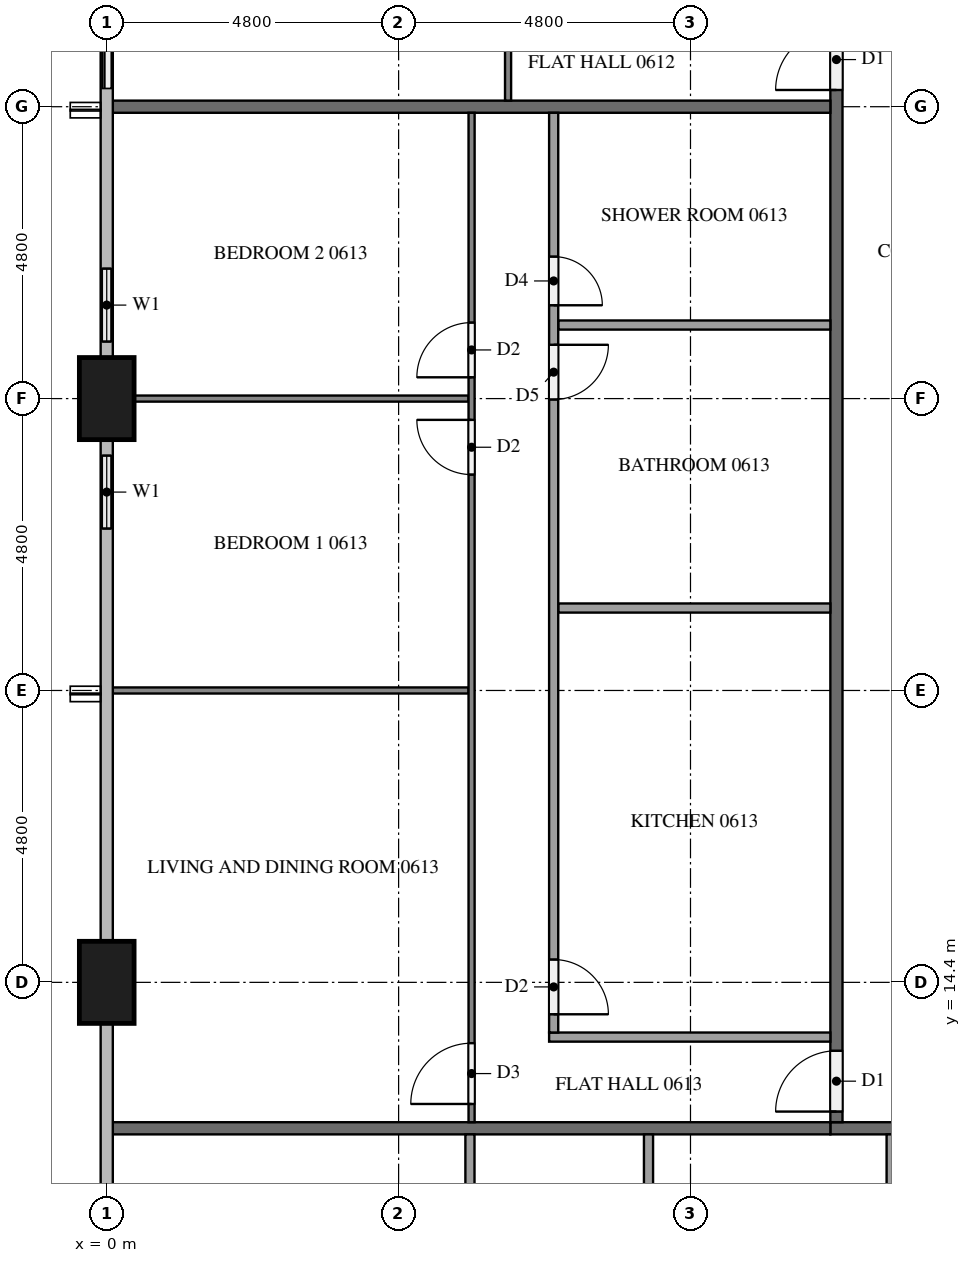
"""IFC4 building model, lengths in metres.
Left out: names, types, materials, properties, quantities, classifications, styles, units other than length and angle.
Written with IfcOpenShell. Run it as: python <this file> out.ifc"""

import sys

from ifc_helpers import new_model, si_unit, direction, frame, frame_2d, origin, origin_2d, place, context, subcontext, project, spatial, rectangle, extrude, element, fill, save


model = new_model("IFC4")
c1 = context("Model", 3, precision=1e-05, world=origin(), true_north=direction((0.0, 1.0)))
c2 = subcontext(c1, "Body", "Model", "MODEL_VIEW")
j1 = project(units=[si_unit("LENGTHUNIT", "METRE"), si_unit("PLANEANGLEUNIT", "RADIAN")], contexts=[c1])
p1 = place(None, origin())
s1 = spatial("IfcSite", under=j1, at=p1, CompositionType="ELEMENT")
p2 = place(p1, origin())
s2 = spatial("IfcBuilding", under=s1, at=p2, CompositionType="ELEMENT")
p3 = place(p2, frame((0.0, 0.0, 29.4)))
s3 = spatial("IfcBuildingStorey", under=s2, at=p3, CompositionType="ELEMENT", Elevation=29.4)
for number, where, z_axis, x_axis in (
    (1, (0.0, 24.0, 0.0), (0.0, 0.0, 1.0), (0.0, 1.0, 0.0)),
    (2, (0.0, 14.4, 0.0), (0.0, 0.0, 1.0), (0.0, 1.0, 0.0)),
):
    element("IfcColumn", number, at=place(p3, frame(where, z_axis=z_axis, x_axis=x_axis)), inside=s3, PredefinedType="COLUMN", context=c2, shape_type="SweptSolid", body=[
        extrude(rectangle(XDim=1.35, YDim=0.9, at=origin_2d()), origin(), (0.0, 0.0, 1.0), 3.2),
    ])
p4 = place(p3, frame((0.0, 31.2, 0.0), z_axis=(0.0, 0.0, 1.0), x_axis=(0.0, -1.0, 0.0)))
e3 = element("IfcWall", 3, at=p4, inside=s3, PredefinedType="SOLIDWALL", context=c2, shape_type="SweptSolid", body=[
    extrude(rectangle(XDim=2.4, YDim=0.15, at=frame_2d((1.2, 0.0))), origin(), (0.0, 0.0, 1.0), 3.2),
])
p5 = place(p4, frame((0.3, 0.0, 0.0)))
e4 = element("IfcOpeningElement", 4, at=p5, cuts=e3, PredefinedType="OPENING", context=c2, shape_type="SweptSolid", body=[
    extrude(rectangle(XDim=1.8, YDim=2.4, at=frame_2d((0.9, 1.2))), frame((0.0, 0.085, 0.0), z_axis=(0.0, -1.0, 0.0), x_axis=(1.0, 0.0, 0.0)), (0.0, 0.0, 1.0), 0.17),
])
p6 = place(p3, frame((0.0, 26.4, 0.0), z_axis=(0.0, 0.0, 1.0), x_axis=(0.0, -1.0, 0.0)))
e5 = element("IfcWall", 5, at=p6, inside=s3, PredefinedType="SOLIDWALL", context=c2, shape_type="SweptSolid", body=[
    extrude(rectangle(XDim=1.725, YDim=0.15, at=frame_2d((0.862, 0.0))), origin(), (0.0, 0.0, 1.0), 3.2),
])
p7 = place(p6, frame((0.262, 0.0, 0.9)))
e6 = element("IfcOpeningElement", 6, at=p7, cuts=e5, PredefinedType="OPENING", context=c2, shape_type="SweptSolid", body=[
    extrude(rectangle(XDim=1.2, YDim=1.4, at=frame_2d((0.6, 0.7))), frame((0.0, 0.085, 0.0), z_axis=(0.0, -1.0, 0.0), x_axis=(1.0, 0.0, 0.0)), (0.0, 0.0, 1.0), 0.17),
])
p8 = place(p3, frame((0.0, 23.325, 0.0), z_axis=(0.0, 0.0, 1.0), x_axis=(0.0, -1.0, 0.0)))
e7 = element("IfcWall", 7, at=p8, inside=s3, PredefinedType="SOLIDWALL", context=c2, shape_type="SweptSolid", body=[
    extrude(rectangle(XDim=1.725, YDim=0.15, at=frame_2d((0.862, 0.0))), origin(), (0.0, 0.0, 1.0), 3.2),
])
p9 = place(p8, frame((0.262, 0.0, 0.9)))
e8 = element("IfcOpeningElement", 8, at=p9, cuts=e7, PredefinedType="OPENING", context=c2, shape_type="SweptSolid", body=[
    extrude(rectangle(XDim=1.2, YDim=1.4, at=frame_2d((0.6, 0.7))), frame((0.0, 0.085, 0.0), z_axis=(0.0, -1.0, 0.0), x_axis=(1.0, 0.0, 0.0)), (0.0, 0.0, 1.0), 0.17),
])
p10 = place(p3, frame((50.5, 12.0, 0.0), z_axis=(0.0, 0.0, 1.0), x_axis=(-1.0, 0.0, 0.0)))
e9 = element("IfcWall", 9, at=p10, inside=s3, PredefinedType="PARTITIONING", context=c2, shape_type="SweptSolid", body=[
    extrude(rectangle(XDim=38.6, YDim=0.2, at=frame_2d((19.3, 0.0))), origin(), (0.0, 0.0, 1.0), 3.2),
])
p11 = place(p10, frame((36.375, 0.0, 0.0)))
e10 = element("IfcOpeningElement", 10, at=p11, cuts=e9, PredefinedType="OPENING", context=c2, shape_type="SweptSolid", body=[
    extrude(rectangle(XDim=1.0, YDim=2.1, at=frame_2d((0.5, 1.05))), frame((0.0, 0.11, 0.0), z_axis=(0.0, -1.0, 0.0), x_axis=(1.0, 0.0, 0.0)), (0.0, 0.0, 1.0), 0.22),
])
p12 = place(p10, frame((34.825, 0.0, 0.0)))
e11 = element("IfcOpeningElement", 11, at=p12, cuts=e9, PredefinedType="OPENING", context=c2, shape_type="SweptSolid", body=[
    extrude(rectangle(XDim=1.0, YDim=2.1, at=frame_2d((0.5, 1.05))), frame((0.0, 0.11, 0.0), z_axis=(0.0, -1.0, 0.0), x_axis=(1.0, 0.0, 0.0)), (0.0, 0.0, 1.0), 0.22),
])
p13 = place(p10, frame((22.825, 0.0, 0.0)))
e12 = element("IfcOpeningElement", 12, at=p13, cuts=e9, PredefinedType="OPENING", context=c2, shape_type="SweptSolid", body=[
    extrude(rectangle(XDim=1.0, YDim=2.1, at=frame_2d((0.5, 1.05))), frame((0.0, 0.11, 0.0), z_axis=(0.0, -1.0, 0.0), x_axis=(1.0, 0.0, 0.0)), (0.0, 0.0, 1.0), 0.22),
])
p14 = place(p10, frame((8.425, 0.0, 0.0)))
e13 = element("IfcOpeningElement", 13, at=p14, cuts=e9, PredefinedType="OPENING", context=c2, shape_type="SweptSolid", body=[
    extrude(rectangle(XDim=1.0, YDim=2.1, at=frame_2d((0.5, 1.05))), frame((0.0, 0.11, 0.0), z_axis=(0.0, -1.0, 0.0), x_axis=(1.0, 0.0, 0.0)), (0.0, 0.0, 1.0), 0.22),
])
p15 = place(p10, frame((1.225, 0.0, 0.0)))
e14 = element("IfcOpeningElement", 14, at=p15, cuts=e9, PredefinedType="OPENING", context=c2, shape_type="SweptSolid", body=[
    extrude(rectangle(XDim=1.0, YDim=2.1, at=frame_2d((0.5, 1.05))), frame((0.0, 0.11, 0.0), z_axis=(0.0, -1.0, 0.0), x_axis=(1.0, 0.0, 0.0)), (0.0, 0.0, 1.0), 0.22),
])
p16 = place(p3, frame((12.0, 12.1, 0.0), z_axis=(0.0, 0.0, 1.0), x_axis=(0.0, 1.0, 0.0)))
e15 = element("IfcWall", 15, at=p16, inside=s3, PredefinedType="PARTITIONING", context=c2, shape_type="SweptSolid", body=[
    extrude(rectangle(XDim=28.6, YDim=0.2, at=frame_2d((14.3, 0.0))), origin(), (0.0, 0.0, 1.0), 3.2),
])
p17 = place(p16, frame((16.975, 0.0, 0.0)))
e16 = element("IfcOpeningElement", 16, at=p17, cuts=e15, PredefinedType="OPENING", context=c2, shape_type="SweptSolid", body=[
    extrude(rectangle(XDim=1.0, YDim=2.1, at=frame_2d((0.5, 1.05))), frame((0.0, 0.11, 0.0), z_axis=(0.0, -1.0, 0.0), x_axis=(1.0, 0.0, 0.0)), (0.0, 0.0, 1.0), 0.22),
])
p18 = place(p16, frame((0.175, 0.0, 0.0)))
e17 = element("IfcOpeningElement", 17, at=p18, cuts=e15, PredefinedType="OPENING", context=c2, shape_type="SweptSolid", body=[
    extrude(rectangle(XDim=1.0, YDim=2.1, at=frame_2d((0.5, 1.05))), frame((0.0, 0.11, 0.0), z_axis=(0.0, -1.0, 0.0), x_axis=(1.0, 0.0, 0.0)), (0.0, 0.0, 1.0), 0.22),
])
for number, where, z_axis, x_axis in (
    (18, (0.1, 12.0, 0.0), (0.0, 0.0, 1.0), (1.0, 0.0, 0.0)),
    (19, (0.1, 28.8, 0.0), (0.0, 0.0, 1.0), (1.0, 0.0, 0.0)),
):
    element("IfcWall", number, at=place(p3, frame(where, z_axis=z_axis, x_axis=x_axis)), inside=s3, PredefinedType="PARTITIONING", context=c2, shape_type="SweptSolid", body=[
        extrude(rectangle(XDim=11.8, YDim=0.2, at=frame_2d((5.9, 0.0))), origin(), (0.0, 0.0, 1.0), 3.2),
    ])
for number, where, z_axis, x_axis in (
    (20, (8.91, 11.9, 0.0), (0.0, 0.0, 1.0), (0.0, -1.0, 0.0)),
    (21, (5.973, 11.9, 0.0), (0.0, 0.0, 1.0), (0.0, -1.0, 0.0)),
):
    element("IfcWall", number, at=place(p3, frame(where, z_axis=z_axis, x_axis=x_axis)), inside=s3, PredefinedType="PARTITIONING", context=c2, shape_type="SweptSolid", body=[
        extrude(rectangle(XDim=2.975, YDim=0.15, at=frame_2d((1.487, 0.0))), origin(), (0.0, 0.0, 1.0), 3.2),
    ])
p19 = place(p3, frame((12.9, 11.9, 0.0), z_axis=(0.0, 0.0, 1.0), x_axis=(0.0, -1.0, 0.0)))
e22 = element("IfcWall", 22, at=p19, inside=s3, PredefinedType="PARTITIONING", context=c2, shape_type="SweptSolid", body=[
    extrude(rectangle(XDim=3.125, YDim=0.15, at=frame_2d((1.562, 0.0))), origin(), (0.0, 0.0, 1.0), 3.2),
])
p20 = place(p3, frame((6.6, 28.9, 0.0), z_axis=(0.0, 0.0, 1.0), x_axis=(0.0, 1.0, 0.0)))
e23 = element("IfcWall", 23, at=p20, inside=s3, PredefinedType="PARTITIONING", context=c2, shape_type="SweptSolid", body=[
    extrude(rectangle(XDim=11.8, YDim=0.1, at=frame_2d((5.9, 0.0))), origin(), (0.0, 0.0, 1.0), 3.2),
])
p21 = place(p20, frame((5.75, 0.0, 0.0)))
e24 = element("IfcOpeningElement", 24, at=p21, cuts=e23, PredefinedType="OPENING", context=c2, shape_type="SweptSolid", body=[
    extrude(rectangle(XDim=1.0, YDim=2.1, at=frame_2d((0.5, 1.05))), frame((0.0, 0.06, 0.0), z_axis=(0.0, -1.0, 0.0), x_axis=(1.0, 0.0, 0.0)), (0.0, 0.0, 1.0), 0.12),
])
p22 = place(p20, frame((7.45, 0.0, 0.0)))
e25 = element("IfcOpeningElement", 25, at=p22, cuts=e23, PredefinedType="OPENING", context=c2, shape_type="SweptSolid", body=[
    extrude(rectangle(XDim=0.9, YDim=2.1, at=frame_2d((0.45, 1.05))), frame((0.0, 0.06, 0.0), z_axis=(0.0, -1.0, 0.0), x_axis=(1.0, 0.0, 0.0)), (0.0, 0.0, 1.0), 0.12),
])
p23 = place(p3, frame((5.95, 19.2, 0.0), z_axis=(0.0, 0.0, 1.0), x_axis=(-1.0, 0.0, 0.0)))
e26 = element("IfcWall", 26, at=p23, inside=s3, PredefinedType="PARTITIONING", context=c2, shape_type="SweptSolid", body=[
    extrude(rectangle(XDim=5.85, YDim=0.1, at=frame_2d((2.925, 0.0))), origin(), (0.0, 0.0, 1.0), 3.2),
])
p24 = place(p3, frame((5.95, 24.0, 0.0), z_axis=(0.0, 0.0, 1.0), x_axis=(-1.0, 0.0, 0.0)))
e27 = element("IfcWall", 27, at=p24, inside=s3, PredefinedType="PARTITIONING", context=c2, shape_type="SweptSolid", body=[
    extrude(rectangle(XDim=5.5, YDim=0.1, at=frame_2d((2.75, 0.0))), origin(), (0.0, 0.0, 1.0), 3.2),
])
p25 = place(p3, frame((6.0, 12.1, 0.0), z_axis=(0.0, 0.0, 1.0), x_axis=(0.0, 1.0, 0.0)))
e28 = element("IfcWall", 28, at=p25, inside=s3, PredefinedType="PARTITIONING", context=c2, shape_type="SweptSolid", body=[
    extrude(rectangle(XDim=16.6, YDim=0.1, at=frame_2d((8.3, 0.0))), origin(), (0.0, 0.0, 1.0), 3.2),
])
p26 = place(p25, frame((0.3, 0.0, 0.0)))
e29 = element("IfcOpeningElement", 29, at=p26, cuts=e28, PredefinedType="OPENING", context=c2, shape_type="SweptSolid", body=[
    extrude(rectangle(XDim=1.0, YDim=2.1, at=frame_2d((0.5, 1.05))), frame((0.0, 0.06, 0.0), z_axis=(0.0, -1.0, 0.0), x_axis=(1.0, 0.0, 0.0)), (0.0, 0.0, 1.0), 0.12),
])
p27 = place(p25, frame((10.65, 0.0, 0.0)))
e30 = element("IfcOpeningElement", 30, at=p27, cuts=e28, PredefinedType="OPENING", context=c2, shape_type="SweptSolid", body=[
    extrude(rectangle(XDim=0.9, YDim=2.1, at=frame_2d((0.45, 1.05))), frame((0.0, 0.06, 0.0), z_axis=(0.0, -1.0, 0.0), x_axis=(1.0, 0.0, 0.0)), (0.0, 0.0, 1.0), 0.12),
])
p28 = place(p25, frame((12.25, 0.0, 0.0)))
e31 = element("IfcOpeningElement", 31, at=p28, cuts=e28, PredefinedType="OPENING", context=c2, shape_type="SweptSolid", body=[
    extrude(rectangle(XDim=0.9, YDim=2.1, at=frame_2d((0.45, 1.05))), frame((0.0, 0.06, 0.0), z_axis=(0.0, -1.0, 0.0), x_axis=(1.0, 0.0, 0.0)), (0.0, 0.0, 1.0), 0.12),
])
for number, where, z_axis, x_axis in (
    (32, (11.9, 20.556, 0.0), (0.0, 0.0, 1.0), (-1.0, 0.0, 0.0)),
    (33, (11.9, 25.21, 0.0), (0.0, 0.0, 1.0), (-1.0, 0.0, 0.0)),
):
    element("IfcWall", number, at=place(p3, frame(where, z_axis=z_axis, x_axis=x_axis)), inside=s3, PredefinedType="PARTITIONING", context=c2, shape_type="SweptSolid", body=[
        extrude(rectangle(XDim=4.475, YDim=0.15, at=frame_2d((2.237, 0.0))), origin(), (0.0, 0.0, 1.0), 3.2),
    ])
p29 = place(p3, frame((11.9, 13.5, 0.0), z_axis=(0.0, 0.0, 1.0), x_axis=(-1.0, 0.0, 0.0)))
e34 = element("IfcWall", 34, at=p29, inside=s3, PredefinedType="PARTITIONING", context=c2, shape_type="SweptSolid", body=[
    extrude(rectangle(XDim=4.625, YDim=0.15, at=frame_2d((2.312, 0.0))), origin(), (0.0, 0.0, 1.0), 3.2),
])
p30 = place(p3, frame((7.35, 28.7, 0.0), z_axis=(0.0, 0.0, 1.0), x_axis=(0.0, -1.0, 0.0)))
e35 = element("IfcWall", 35, at=p30, inside=s3, PredefinedType="PARTITIONING", context=c2, shape_type="SweptSolid", body=[
    extrude(rectangle(XDim=15.125, YDim=0.15, at=frame_2d((7.562, 0.0))), origin(), (0.0, 0.0, 1.0), 3.2),
])
p31 = place(p30, frame((13.925, 0.0, 0.0)))
e36 = element("IfcOpeningElement", 36, at=p31, cuts=e35, PredefinedType="OPENING", context=c2, shape_type="SweptSolid", body=[
    extrude(rectangle(XDim=0.9, YDim=2.1, at=frame_2d((0.45, 1.05))), frame((0.0, 0.085, 0.0), z_axis=(0.0, -1.0, 0.0), x_axis=(1.0, 0.0, 0.0)), (0.0, 0.0, 1.0), 0.17),
])
p32 = place(p30, frame((3.815, 0.0, 0.0)))
e37 = element("IfcOpeningElement", 37, at=p32, cuts=e35, PredefinedType="OPENING", context=c2, shape_type="SweptSolid", body=[
    extrude(rectangle(XDim=0.9, YDim=2.1, at=frame_2d((0.45, 1.05))), frame((0.0, 0.085, 0.0), z_axis=(0.0, -1.0, 0.0), x_axis=(1.0, 0.0, 0.0)), (0.0, 0.0, 1.0), 0.17),
])
p33 = place(p30, frame((2.365, 0.0, 0.0)))
e38 = element("IfcOpeningElement", 38, at=p33, cuts=e35, PredefinedType="OPENING", context=c2, shape_type="SweptSolid", body=[
    extrude(rectangle(XDim=0.8, YDim=2.1, at=frame_2d((0.4, 1.05))), frame((0.0, 0.085, 0.0), z_axis=(0.0, -1.0, 0.0), x_axis=(1.0, 0.0, 0.0)), (0.0, 0.0, 1.0), 0.17),
])
p34 = place(p5, origin())
e39 = element("IfcDoor", 39, at=p34, inside=s3, OperationType="SLIDING_TO_RIGHT", PredefinedType="DOOR", context=c2, shape_type="SweptSolid", body=[
    extrude(rectangle(XDim=1.8, YDim=2.4, at=frame_2d((0.9, 1.2))), frame((0.0, 0.025, 0.0), z_axis=(0.0, -1.0, 0.0), x_axis=(1.0, 0.0, 0.0)), (0.0, 0.0, 1.0), 0.05),
])
fill(e4, e39)
p35 = place(p7, origin())
e40 = element("IfcWindow", 40, at=p35, inside=s3, PartitioningType="SINGLE_PANEL", PredefinedType="WINDOW", context=c2, shape_type="SweptSolid", body=[
    extrude(rectangle(XDim=1.2, YDim=1.4, at=frame_2d((0.6, 0.7))), frame((0.0, 0.03, 0.0), z_axis=(0.0, -1.0, 0.0), x_axis=(1.0, 0.0, 0.0)), (0.0, 0.0, 1.0), 0.06),
])
fill(e6, e40)
p36 = place(p9, origin())
e41 = element("IfcWindow", 41, at=p36, inside=s3, PartitioningType="SINGLE_PANEL", PredefinedType="WINDOW", context=c2, shape_type="SweptSolid", body=[
    extrude(rectangle(XDim=1.2, YDim=1.4, at=frame_2d((0.6, 0.7))), frame((0.0, 0.03, 0.0), z_axis=(0.0, -1.0, 0.0), x_axis=(1.0, 0.0, 0.0)), (0.0, 0.0, 1.0), 0.06),
])
fill(e8, e41)
p37 = place(p17, origin())
e42 = element("IfcDoor", 42, at=p37, inside=s3, OperationType="SINGLE_SWING_LEFT", PredefinedType="DOOR", context=c2, shape_type="SweptSolid", body=[
    extrude(rectangle(XDim=1.0, YDim=2.1, at=frame_2d((0.5, 1.05))), frame((0.0, 0.025, 0.0), z_axis=(0.0, -1.0, 0.0), x_axis=(1.0, 0.0, 0.0)), (0.0, 0.0, 1.0), 0.05),
])
fill(e16, e42)
p38 = place(p18, origin())
e43 = element("IfcDoor", 43, at=p38, inside=s3, OperationType="SINGLE_SWING_LEFT", PredefinedType="DOOR", context=c2, shape_type="SweptSolid", body=[
    extrude(rectangle(XDim=1.0, YDim=2.1, at=frame_2d((0.5, 1.05))), frame((0.0, 0.025, 0.0), z_axis=(0.0, -1.0, 0.0), x_axis=(1.0, 0.0, 0.0)), (0.0, 0.0, 1.0), 0.05),
])
fill(e17, e43)
p39 = place(p26, origin())
e44 = element("IfcDoor", 44, at=p39, inside=s3, OperationType="SINGLE_SWING_LEFT", PredefinedType="DOOR", context=c2, shape_type="SweptSolid", body=[
    extrude(rectangle(XDim=1.0, YDim=2.1, at=frame_2d((0.5, 1.05))), frame((0.0, 0.025, 0.0), z_axis=(0.0, -1.0, 0.0), x_axis=(1.0, 0.0, 0.0)), (0.0, 0.0, 1.0), 0.05),
])
fill(e29, e44)
p40 = place(p27, origin())
e45 = element("IfcDoor", 45, at=p40, inside=s3, OperationType="SINGLE_SWING_RIGHT", PredefinedType="DOOR", context=c2, shape_type="SweptSolid", body=[
    extrude(rectangle(XDim=0.9, YDim=2.1, at=frame_2d((0.45, 1.05))), frame((0.0, 0.025, 0.0), z_axis=(0.0, -1.0, 0.0), x_axis=(1.0, 0.0, 0.0)), (0.0, 0.0, 1.0), 0.05),
])
fill(e30, e45)
p41 = place(p28, origin())
e46 = element("IfcDoor", 46, at=p41, inside=s3, OperationType="SINGLE_SWING_LEFT", PredefinedType="DOOR", context=c2, shape_type="SweptSolid", body=[
    extrude(rectangle(XDim=0.9, YDim=2.1, at=frame_2d((0.45, 1.05))), frame((0.0, 0.025, 0.0), z_axis=(0.0, -1.0, 0.0), x_axis=(1.0, 0.0, 0.0)), (0.0, 0.0, 1.0), 0.05),
])
fill(e31, e46)
p42 = place(p31, origin())
e47 = element("IfcDoor", 47, at=p42, inside=s3, OperationType="SINGLE_SWING_RIGHT", PredefinedType="DOOR", context=c2, shape_type="SweptSolid", body=[
    extrude(rectangle(XDim=0.9, YDim=2.1, at=frame_2d((0.45, 1.05))), frame((0.0, 0.025, 0.0), z_axis=(0.0, -1.0, 0.0), x_axis=(1.0, 0.0, 0.0)), (0.0, 0.0, 1.0), 0.05),
])
fill(e36, e47)
p43 = place(p32, origin())
e48 = element("IfcDoor", 48, at=p43, inside=s3, OperationType="SINGLE_SWING_LEFT", PredefinedType="DOOR", context=c2, shape_type="SweptSolid", body=[
    extrude(rectangle(XDim=0.9, YDim=2.1, at=frame_2d((0.45, 1.05))), frame((0.0, 0.025, 0.0), z_axis=(0.0, -1.0, 0.0), x_axis=(1.0, 0.0, 0.0)), (0.0, 0.0, 1.0), 0.05),
])
fill(e37, e48)
p44 = place(p33, origin())
e49 = element("IfcDoor", 49, at=p44, inside=s3, OperationType="SINGLE_SWING_RIGHT", PredefinedType="DOOR", context=c2, shape_type="SweptSolid", body=[
    extrude(rectangle(XDim=0.8, YDim=2.1, at=frame_2d((0.4, 1.05))), frame((0.0, 0.025, 0.0), z_axis=(0.0, -1.0, 0.0), x_axis=(1.0, 0.0, 0.0)), (0.0, 0.0, 1.0), 0.05),
])
fill(e38, e49)
save(model, sys.argv[1])
